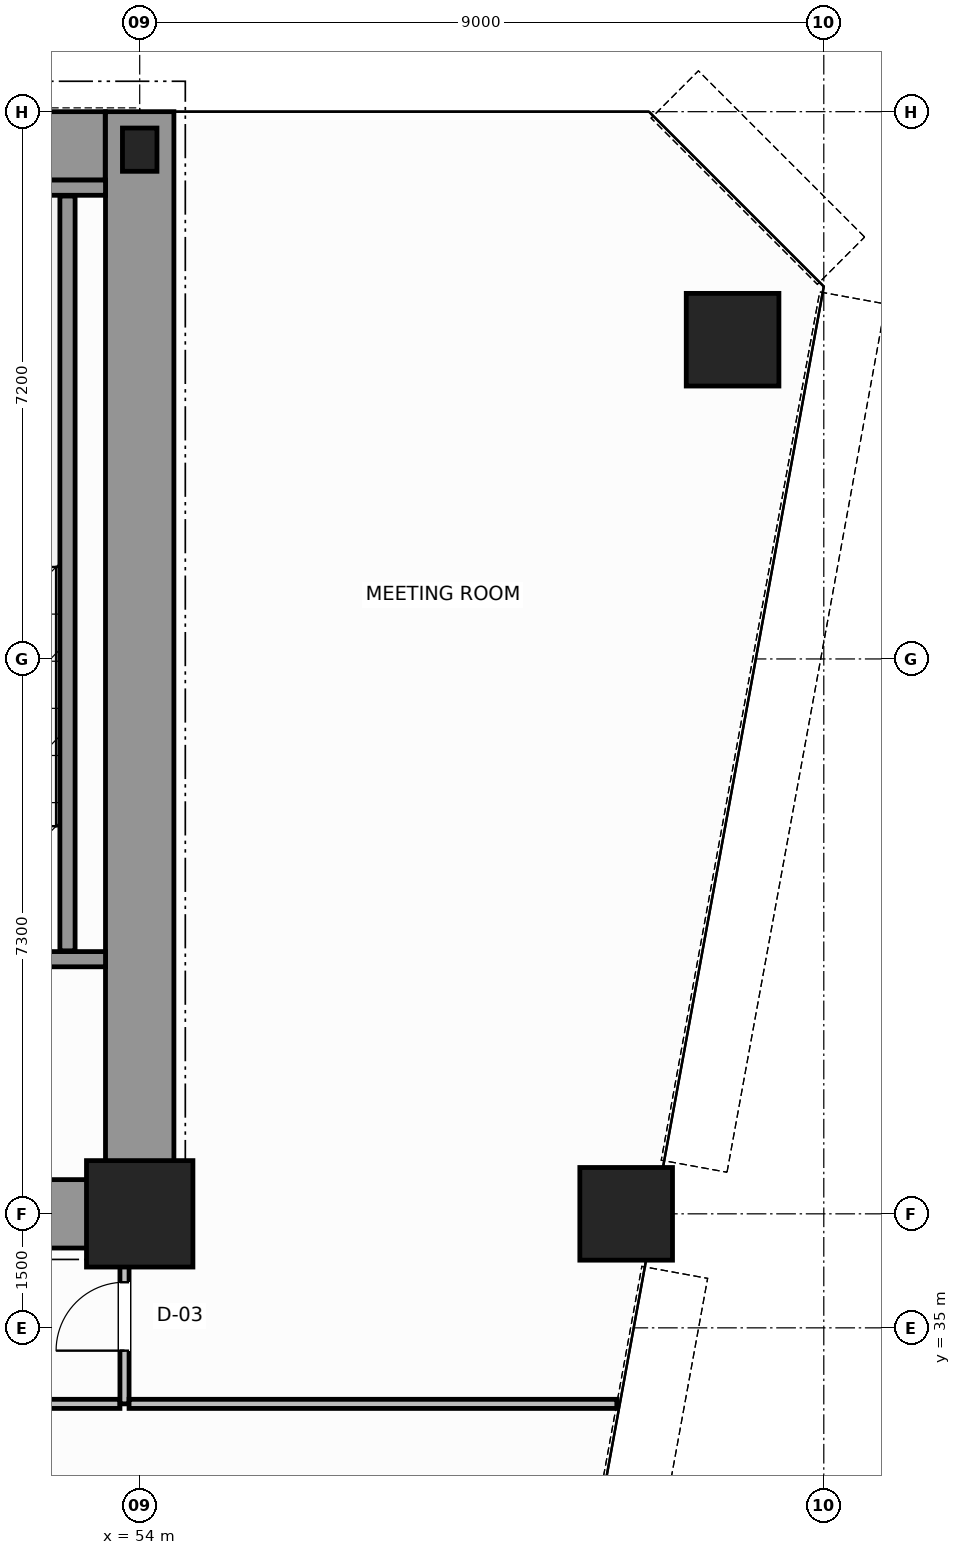
"""IFC4 building model, lengths in metres.
Left out: names, types, materials, properties, quantities, classifications, styles, units other than length and angle.
Written with IfcOpenShell. Run it as: python <this file> out.ifc"""

import sys

from ifc_helpers import new_model, si_unit, direction, frame, frame_2d, origin, origin_2d, place, context, subcontext, project, spatial, rectangle, hollow_circle, i_section, extrude, source, transform, mapped, element, fill, save


model = new_model("IFC4")
c1 = context("Model", 3, precision=1e-05, world=origin(), true_north=direction((0.0, 1.0)))
c2 = subcontext(c1, "Body", "Model", "MODEL_VIEW")
j1 = project(units=[si_unit("LENGTHUNIT", "METRE"), si_unit("PLANEANGLEUNIT", "RADIAN")], contexts=[c1])
p1 = place(None, origin())
s1 = spatial("IfcSite", under=j1, at=p1, CompositionType="ELEMENT")
p2 = place(p1, origin())
s2 = spatial("IfcBuilding", under=s1, at=p2, CompositionType="ELEMENT")
p3 = place(p2, frame((0.0, 0.0, 68.2)))
s3 = spatial("IfcBuildingStorey", under=s2, at=p3, CompositionType="ELEMENT", Elevation=68.2)
m1 = source(origin(), c2, "Body", "SweptSolid", [
    extrude(rectangle(XDim=1.4, YDim=1.4, at=origin_2d()), origin(), (0.0, 0.0, 1.0), 3.8),
])
p4 = place(p3, frame((54.0, 36.5, 0.0), z_axis=(0.0, 0.0, 1.0), x_axis=(1.0, 0.0, 0.0)))
e1 = element("IfcColumn", 1, at=p4, inside=s3, PredefinedType="COLUMN", context=c2, shape_type="MappedRepresentation", body=[
    mapped(m1, transform((0.0, 0.0, 0.0), scale=1.0)),
])
m2 = source(origin(), c2, "Body", "SweptSolid", [
    extrude(i_section(OverallWidth=0.454, OverallDepth=0.569, WebThickness=0.078, FlangeThickness=0.08, FilletRadius=0.015, at=origin_2d()), origin(), (0.0, 0.0, 1.0), 3.8),
])
p5 = place(p3, frame((54.0, 50.5, 0.0), z_axis=(0.0, 0.0, 1.0), x_axis=(1.0, 0.0, 0.0)))
e2 = element("IfcColumn", 2, at=p5, inside=s3, PredefinedType="COLUMN", context=c2, shape_type="MappedRepresentation", body=[
    mapped(m2, transform((0.0, 0.0, 0.0), scale=1.0)),
])
m3 = source(origin(), c2, "Body", "SweptSolid", [
    extrude(hollow_circle(Radius=0.61, WallThickness=0.05, at=origin_2d()), origin(), (0.0, 0.0, 1.0), 3.8),
])
for number, where, z_axis, x_axis in (
    (3, (61.8, 48.0, 0.0), (0.0, 0.0, 1.0), (1.0, 0.0, 0.0)),
    (4, (60.4, 36.5, 0.0), (0.0, 0.0, 1.0), (1.0, 0.0, 0.0)),
):
    element("IfcColumn", number, at=place(p3, frame(where, z_axis=z_axis, x_axis=x_axis)), inside=s3, PredefinedType="COLUMN", context=c2, shape_type="MappedRepresentation", body=[
        mapped(m3, transform((0.0, 0.0, 0.0), scale=1.0)),
    ])
p6 = place(p3, frame((34.002, 50.55, 0.0), z_axis=(0.0, 0.0, 1.0), x_axis=(1.0, 0.0, 0.0)))
e5 = element("IfcWall", 5, at=p6, inside=s3, PredefinedType="SHEAR", context=c2, shape_type="SweptSolid", body=[
    extrude(rectangle(XDim=19.544, YDim=0.9, at=frame_2d((9.772, 0.0))), origin(), (0.0, 0.0, 1.0), 3.8),
])
p7 = place(p3, frame((54.0, 36.5, 0.0), z_axis=(0.0, 0.0, 1.0), x_axis=(0.0, 1.0, 0.0)))
e6 = element("IfcWall", 6, at=p7, inside=s3, PredefinedType="SHEAR", context=c2, shape_type="SweptSolid", body=[
    extrude(rectangle(XDim=14.5, YDim=0.9, at=frame_2d((7.25, 0.0))), origin(), (0.0, 0.0, 1.0), 3.8),
])
p8 = place(p3, frame((49.8, 36.5, 0.0), z_axis=(0.0, 0.0, 1.0), x_axis=(1.0, 0.0, 0.0)))
e7 = element("IfcWall", 7, at=p8, inside=s3, PredefinedType="SHEAR", context=c2, shape_type="SweptSolid", body=[
    extrude(rectangle(XDim=3.73, YDim=0.9, at=frame_2d((1.865, 0.0))), origin(), (0.0, 0.0, 1.0), 2.38),
])
p9 = place(p3, frame((49.4, 39.85, 0.0), z_axis=(0.0, 0.0, 1.0), x_axis=(1.0, 0.0, 0.0)))
e8 = element("IfcWall", 8, at=p9, inside=s3, PredefinedType="SOLIDWALL", context=c2, shape_type="SweptSolid", body=[
    extrude(rectangle(XDim=4.15, YDim=0.2, at=frame_2d((2.075, 0.0))), origin(), (0.0, 0.0, 1.0), 3.8),
])
p10 = place(p9, frame((1.325, 0.0, 0.0)))
e9 = element("IfcOpeningElement", 9, at=p10, cuts=e8, PredefinedType="OPENING", context=c2, shape_type="SweptSolid", body=[
    extrude(rectangle(XDim=1.1, YDim=2.15, at=frame_2d((0.55, 1.075))), frame((0.0, 0.11, 0.0), z_axis=(0.0, -1.0, 0.0), x_axis=(1.0, 0.0, 0.0)), (0.0, 0.0, 1.0), 0.22),
])
p11 = place(p3, frame((49.4, 50.0, 0.0), z_axis=(0.0, 0.0, 1.0), x_axis=(1.0, 0.0, 0.0)))
e10 = element("IfcWall", 10, at=p11, inside=s3, PredefinedType="SOLIDWALL", context=c2, shape_type="SweptSolid", body=[
    extrude(rectangle(XDim=4.15, YDim=0.2, at=frame_2d((2.075, 0.0))), origin(), (0.0, 0.0, 1.0), 3.8),
])
p12 = place(p3, frame((53.05, 39.96, 0.0), z_axis=(0.0, 0.0, 1.0), x_axis=(0.0, 1.0, 0.0)))
e11 = element("IfcWall", 11, at=p12, inside=s3, PredefinedType="SOLIDWALL", context=c2, shape_type="SweptSolid", body=[
    extrude(rectangle(XDim=9.93, YDim=0.2, at=frame_2d((4.965, 0.0))), origin(), (0.0, 0.0, 1.0), 3.8),
])
p13 = place(p3, frame((35.66, 34.0, 0.0), z_axis=(0.0, 0.0, 1.0), x_axis=(1.0, 0.0, 0.0)))
e12 = element("IfcWall", 12, at=p13, inside=s3, PredefinedType="PARTITIONING", context=c2, shape_type="SweptSolid", body=[
    extrude(rectangle(XDim=18.08, YDim=0.12, at=frame_2d((9.04, 0.0))), origin(), (0.0, 0.0, 1.0), 3.58),
])
p14 = place(p3, frame((53.8, 34.0, 0.0), z_axis=(0.0, 0.0, 1.0), x_axis=(0.0, 1.0, 0.0)))
e13 = element("IfcWall", 13, at=p14, inside=s3, PredefinedType="PARTITIONING", context=c2, shape_type="SweptSolid", body=[
    extrude(rectangle(XDim=2.44, YDim=0.12, at=frame_2d((1.22, 0.0))), origin(), (0.0, 0.0, 1.0), 3.58),
])
p15 = place(p14, frame((0.7, 0.0, 0.0)))
e14 = element("IfcOpeningElement", 14, at=p15, cuts=e13, PredefinedType="OPENING", context=c2, shape_type="SweptSolid", body=[
    extrude(rectangle(XDim=0.9, YDim=2.15, at=frame_2d((0.45, 1.075))), frame((0.0, 0.07, 0.0), z_axis=(0.0, -1.0, 0.0), x_axis=(1.0, 0.0, 0.0)), (0.0, 0.0, 1.0), 0.14),
])
p16 = place(p3, frame((53.86, 34.0, 0.0), z_axis=(0.0, 0.0, 1.0), x_axis=(1.0, 0.0, 0.0)))
e15 = element("IfcWall", 15, at=p16, inside=s3, PredefinedType="PARTITIONING", context=c2, shape_type="SweptSolid", body=[
    extrude(rectangle(XDim=6.417, YDim=0.12, at=frame_2d((3.208, 0.0))), origin(), (0.0, 0.0, 1.0), 3.58),
])
m4 = source(origin(), c2, "Body", "SweptSolid", [
    extrude(rectangle(XDim=0.9, YDim=2.15, at=frame_2d((0.45, 1.075))), frame((0.0, 0.025, 0.0), z_axis=(0.0, -1.0, 0.0), x_axis=(1.0, 0.0, 0.0)), (0.0, 0.0, 1.0), 0.05),
])
p17 = place(p15, origin())
e16 = element("IfcDoor", 16, at=p17, inside=s3, OperationType="SINGLE_SWING_RIGHT", PredefinedType="DOOR", context=c2, shape_type="MappedRepresentation", body=[
    mapped(m4, transform((0.0, 0.0, 0.0), scale=1.0)),
])
fill(e14, e16)
save(model, sys.argv[1])
